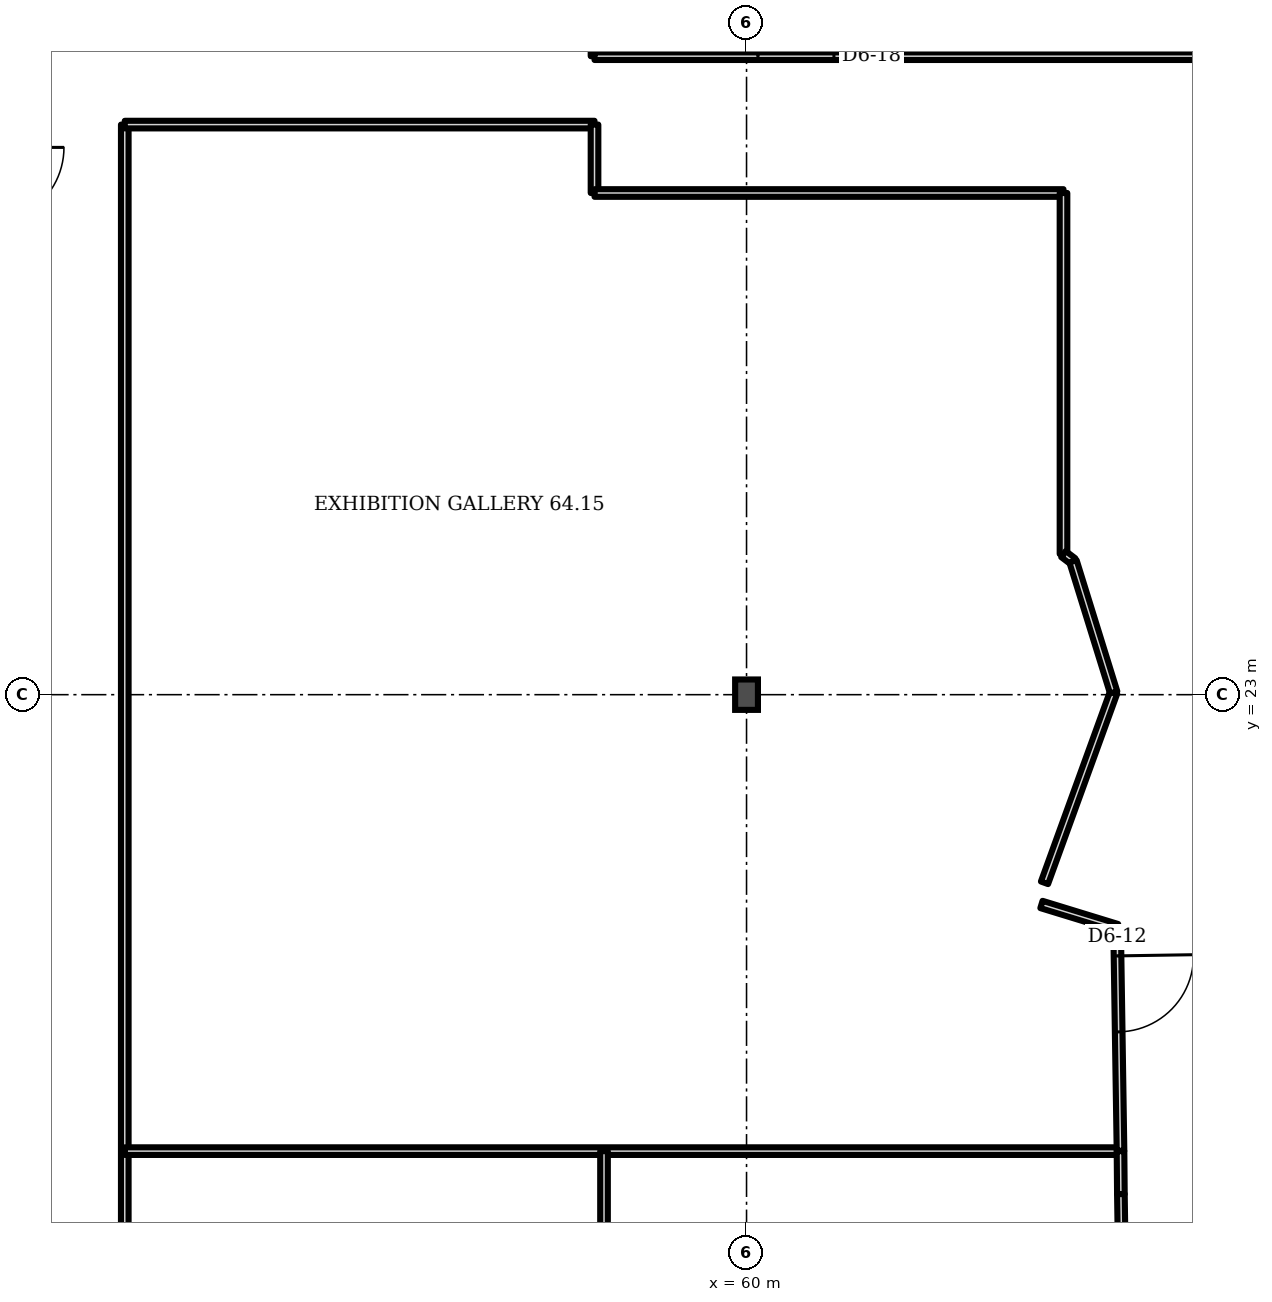
"""IFC4 building model, lengths in metres.
Left out: names, types, materials, properties, quantities, classifications, styles, units other than length and angle.
Written with IfcOpenShell. Run it as: python <this file> out.ifc"""

import sys

from ifc_helpers import new_model, si_unit, direction, frame, frame_2d, origin, origin_2d, place, context, subcontext, project, spatial, rectangle, i_section, extrude, element, fill, save


model = new_model("IFC4")
c1 = context("Model", 3, precision=1e-05, world=origin(), true_north=direction((0.0, 1.0)))
c2 = subcontext(c1, "Body", "Model", "MODEL_VIEW")
j1 = project(units=[si_unit("LENGTHUNIT", "METRE"), si_unit("PLANEANGLEUNIT", "RADIAN")], contexts=[c1])
p1 = place(None, origin())
s1 = spatial("IfcSite", under=j1, at=p1, CompositionType="ELEMENT")
p2 = place(p1, origin())
s2 = spatial("IfcBuilding", under=s1, at=p2, CompositionType="ELEMENT")
p3 = place(p2, frame((0.0, 0.0, 253.9)))
s3 = spatial("IfcBuildingStorey", under=s2, at=p3, CompositionType="ELEMENT", Elevation=253.9)
p4 = place(p3, frame((60.0, 23.0, 0.0), z_axis=(0.0, 0.0, 1.0), x_axis=(1.0, 0.0, 0.0)))
e1 = element("IfcColumn", 1, at=p4, inside=s3, PredefinedType="COLUMN", context=c2, shape_type="SweptSolid", body=[
    extrude(i_section(OverallWidth=0.3, OverallDepth=0.4, WebThickness=0.013, FlangeThickness=0.024, FilletRadius=0.027, at=origin_2d()), origin(), (0.0, 0.0, 1.0), 3.6),
])
p5 = place(p3, frame((51.82, 3.717, 0.0), z_axis=(0.0, 0.0, 1.0), x_axis=(0.0, 1.0, 0.0)))
e2 = element("IfcWall", 2, at=p5, inside=s3, PredefinedType="PARTITIONING", context=c2, shape_type="SweptSolid", body=[
    extrude(rectangle(XDim=26.783, YDim=0.1, at=frame_2d((13.391, 0.0))), origin(), (0.0, 0.0, 1.0), 2.58),
])
p6 = place(p5, frame((2.798, 0.0, 0.0)))
e3 = element("IfcOpeningElement", 3, at=p6, cuts=e2, PredefinedType="OPENING", context=c2, shape_type="SweptSolid", body=[
    extrude(rectangle(XDim=1.0, YDim=2.1, at=frame_2d((0.5, 1.05))), frame((0.0, 0.06, 0.0), z_axis=(0.0, -1.0, 0.0), x_axis=(1.0, 0.0, 0.0)), (0.0, 0.0, 1.0), 0.12),
])
p7 = place(p5, frame((9.453, 0.0, 0.0)))
e4 = element("IfcOpeningElement", 4, at=p7, cuts=e2, PredefinedType="OPENING", context=c2, shape_type="SweptSolid", body=[
    extrude(rectangle(XDim=1.0, YDim=2.1, at=frame_2d((0.5, 1.05))), frame((0.0, 0.06, 0.0), z_axis=(0.0, -1.0, 0.0), x_axis=(1.0, 0.0, 0.0)), (0.0, 0.0, 1.0), 0.12),
])
p8 = place(p3, frame((51.82, 16.995, 0.0), z_axis=(0.0, 0.0, 1.0), x_axis=(1.0, 0.0, 0.0)))
e5 = element("IfcWall", 5, at=p8, inside=s3, PredefinedType="PARTITIONING", context=c2, shape_type="SweptSolid", body=[
    extrude(rectangle(XDim=13.1, YDim=0.1, at=frame_2d((6.55, 0.0))), origin(), (0.0, 0.0, 1.0), 3.2),
])
p9 = place(p3, frame((51.82, 30.5, 0.0), z_axis=(0.0, 0.0, 1.0), x_axis=(1.0, 0.0, 0.0)))
e6 = element("IfcWall", 6, at=p9, inside=s3, PredefinedType="PARTITIONING", context=c2, shape_type="SweptSolid", body=[
    extrude(rectangle(XDim=6.18, YDim=0.1, at=frame_2d((3.09, 0.0))), origin(), (0.0, 0.0, 1.0), 3.2),
])
p10 = place(p3, frame((58.0, 29.6, 0.0), z_axis=(0.0, 0.0, 1.0), x_axis=(0.0, 1.0, 0.0)))
e7 = element("IfcWall", 7, at=p10, inside=s3, PredefinedType="PARTITIONING", context=c2, shape_type="SweptSolid", body=[
    extrude(rectangle(XDim=0.9, YDim=0.1, at=frame_2d((0.45, 0.0))), origin(), (0.0, 0.0, 1.0), 3.2),
])
p11 = place(p3, frame((58.0, 29.6, 0.0), z_axis=(0.0, 0.0, 1.0), x_axis=(1.0, 0.0, 0.0)))
e8 = element("IfcWall", 8, at=p11, inside=s3, PredefinedType="PARTITIONING", context=c2, shape_type="SweptSolid", body=[
    extrude(rectangle(XDim=6.17, YDim=0.1, at=frame_2d((3.085, 0.0))), origin(), (0.0, 0.0, 1.0), 3.2),
])
p12 = place(p3, frame((58.0, 31.4, 0.0), z_axis=(0.0, 0.0, 1.0), x_axis=(0.0, 1.0, 0.0)))
e9 = element("IfcWall", 9, at=p12, inside=s3, PredefinedType="PARTITIONING", context=c2, shape_type="SweptSolid", body=[
    extrude(rectangle(XDim=2.58, YDim=0.1, at=frame_2d((1.29, 0.0))), origin(), (0.0, 0.0, 1.0), 3.2),
])
p13 = place(p3, frame((58.0, 31.4, 0.0), z_axis=(0.0, 0.0, 1.0), x_axis=(1.0, 0.0, 0.0)))
e10 = element("IfcWall", 10, at=p13, inside=s3, PredefinedType="PARTITIONING", context=c2, shape_type="SweptSolid", body=[
    extrude(rectangle(XDim=7.97, YDim=0.1, at=frame_2d((3.985, 0.0))), origin(), (0.0, 0.0, 1.0), 3.2),
])
p14 = place(p13, frame((2.15, 0.0, 0.0)))
e11 = element("IfcOpeningElement", 11, at=p14, cuts=e10, PredefinedType="OPENING", context=c2, shape_type="SweptSolid", body=[
    extrude(rectangle(XDim=1.0, YDim=2.1, at=frame_2d((0.5, 1.05))), frame((0.0, 0.06, 0.0), z_axis=(0.0, -1.0, 0.0), x_axis=(1.0, 0.0, 0.0)), (0.0, 0.0, 1.0), 0.12),
])
p15 = place(p3, frame((58.125, 10.35, 0.0), z_axis=(0.0, 0.0, 1.0), x_axis=(0.0, 1.0, 0.0)))
e12 = element("IfcWall", 12, at=p15, inside=s3, PredefinedType="PARTITIONING", context=c2, shape_type="SweptSolid", body=[
    extrude(rectangle(XDim=6.645, YDim=0.1, at=frame_2d((3.323, 0.0))), origin(), (0.0, 0.0, 1.0), 3.2),
])
p16 = place(p3, frame((63.92, 20.525, 0.0), z_axis=(0.0, 0.0, 1.0), x_axis=(0.341478, 0.939889, 0.0)))
e13 = element("IfcWall", 13, at=p16, inside=s3, PredefinedType="PARTITIONING", context=c2, shape_type="SweptSolid", body=[
    extrude(rectangle(XDim=2.665, YDim=0.1, at=frame_2d((1.333, 0.0))), origin(), (0.0, 0.0, 1.0), 3.2),
])
p17 = place(p3, frame((64.17, 24.85, 0.0), z_axis=(0.0, 0.0, 1.0), x_axis=(0.0, 1.0, 0.0)))
e14 = element("IfcWall", 14, at=p17, inside=s3, PredefinedType="PARTITIONING", context=c2, shape_type="SweptSolid", body=[
    extrude(rectangle(XDim=4.75, YDim=0.1, at=frame_2d((2.375, 0.0))), origin(), (0.0, 0.0, 1.0), 3.2),
])
p18 = place(p3, frame((64.295, 24.755, 0.0), z_axis=(0.0, 0.0, 1.0), x_axis=(-0.795501, 0.605948, 0.0)))
e15 = element("IfcWall", 15, at=p18, inside=s3, PredefinedType="PARTITIONING", context=c2, shape_type="SweptSolid", body=[
    extrude(rectangle(XDim=0.157, YDim=0.1, at=frame_2d((0.079, 0.0))), origin(), (0.0, 0.0, 1.0), 3.2),
])
p19 = place(p3, frame((64.83, 23.03, 0.0), z_axis=(0.0, 0.0, 1.0), x_axis=(-0.296328, 0.95509, 0.0)))
e16 = element("IfcWall", 16, at=p19, inside=s3, PredefinedType="PARTITIONING", context=c2, shape_type="SweptSolid", body=[
    extrude(rectangle(XDim=1.806, YDim=0.1, at=frame_2d((0.903, 0.0))), origin(), (0.0, 0.0, 1.0), 3.2),
])
p20 = place(p3, frame((64.875, 19.935, 0.0), z_axis=(0.0, 0.0, 1.0), x_axis=(-0.956114, 0.29298, 0.0)))
e17 = element("IfcWall", 17, at=p20, inside=s3, PredefinedType="PARTITIONING", context=c2, shape_type="SweptSolid", body=[
    extrude(rectangle(XDim=1.041, YDim=0.1, at=frame_2d((0.521, 0.0))), origin(), (0.0, 0.0, 1.0), 3.2),
])
p21 = place(p3, frame((64.92, 17.0, 0.0), z_axis=(0.0, 0.0, 1.0), x_axis=(-0.015303, 0.999879, 0.0)))
e18 = element("IfcWall", 18, at=p21, inside=s3, PredefinedType="PARTITIONING", context=c2, shape_type="SweptSolid", body=[
    extrude(rectangle(XDim=2.935, YDim=0.1, at=frame_2d((1.468, 0.0))), origin(), (0.0, 0.0, 1.0), 3.2),
])
p22 = place(p21, frame((1.564, 0.0, 0.0)))
e19 = element("IfcOpeningElement", 19, at=p22, cuts=e18, PredefinedType="OPENING", context=c2, shape_type="SweptSolid", body=[
    extrude(rectangle(XDim=1.0, YDim=2.1, at=frame_2d((0.5, 1.05))), frame((0.0, 0.06, 0.0), z_axis=(0.0, -1.0, 0.0), x_axis=(1.0, 0.0, 0.0)), (0.0, 0.0, 1.0), 0.12),
])
p23 = place(p3, frame((64.925, 16.43, 0.0), z_axis=(0.0, 0.0, 1.0), x_axis=(-0.009071, 0.999963, 0.0)))
e20 = element("IfcWall", 20, at=p23, inside=s3, PredefinedType="PARTITIONING", context=c2, shape_type="SweptSolid", body=[
    extrude(rectangle(XDim=0.565, YDim=0.1, at=frame_2d((0.283, 0.0))), origin(), (0.0, 0.0, 1.0), 3.2),
])
p24 = place(p3, frame((64.935, 15.76, 0.0), z_axis=(0.0, 0.0, 1.0), x_axis=(-0.01494, 0.999887, 0.0)))
e21 = element("IfcWall", 21, at=p24, inside=s3, PredefinedType="PARTITIONING", context=c2, shape_type="SweptSolid", body=[
    extrude(rectangle(XDim=0.67, YDim=0.1, at=frame_2d((0.335, 0.0))), origin(), (0.0, 0.0, 1.0), 3.2),
])
p25 = place(p22, origin())
e22 = element("IfcDoor", 22, at=p25, inside=s3, OperationType="SINGLE_SWING_RIGHT", PredefinedType="DOOR", context=c2, shape_type="SweptSolid", body=[
    extrude(rectangle(XDim=1.0, YDim=2.1, at=frame_2d((0.5, 1.05))), frame((0.0, 0.025, 0.0), z_axis=(0.0, -1.0, 0.0), x_axis=(1.0, 0.0, 0.0)), (0.0, 0.0, 1.0), 0.05),
])
fill(e19, e22)
p26 = place(p14, origin())
e23 = element("IfcDoor", 23, at=p26, inside=s3, OperationType="SINGLE_SWING_LEFT", PredefinedType="DOOR", context=c2, shape_type="SweptSolid", body=[
    extrude(rectangle(XDim=1.0, YDim=2.1, at=frame_2d((0.5, 1.05))), frame((0.0, 0.025, 0.0), z_axis=(0.0, -1.0, 0.0), x_axis=(1.0, 0.0, 0.0)), (0.0, 0.0, 1.0), 0.05),
])
fill(e11, e23)
save(model, sys.argv[1])
